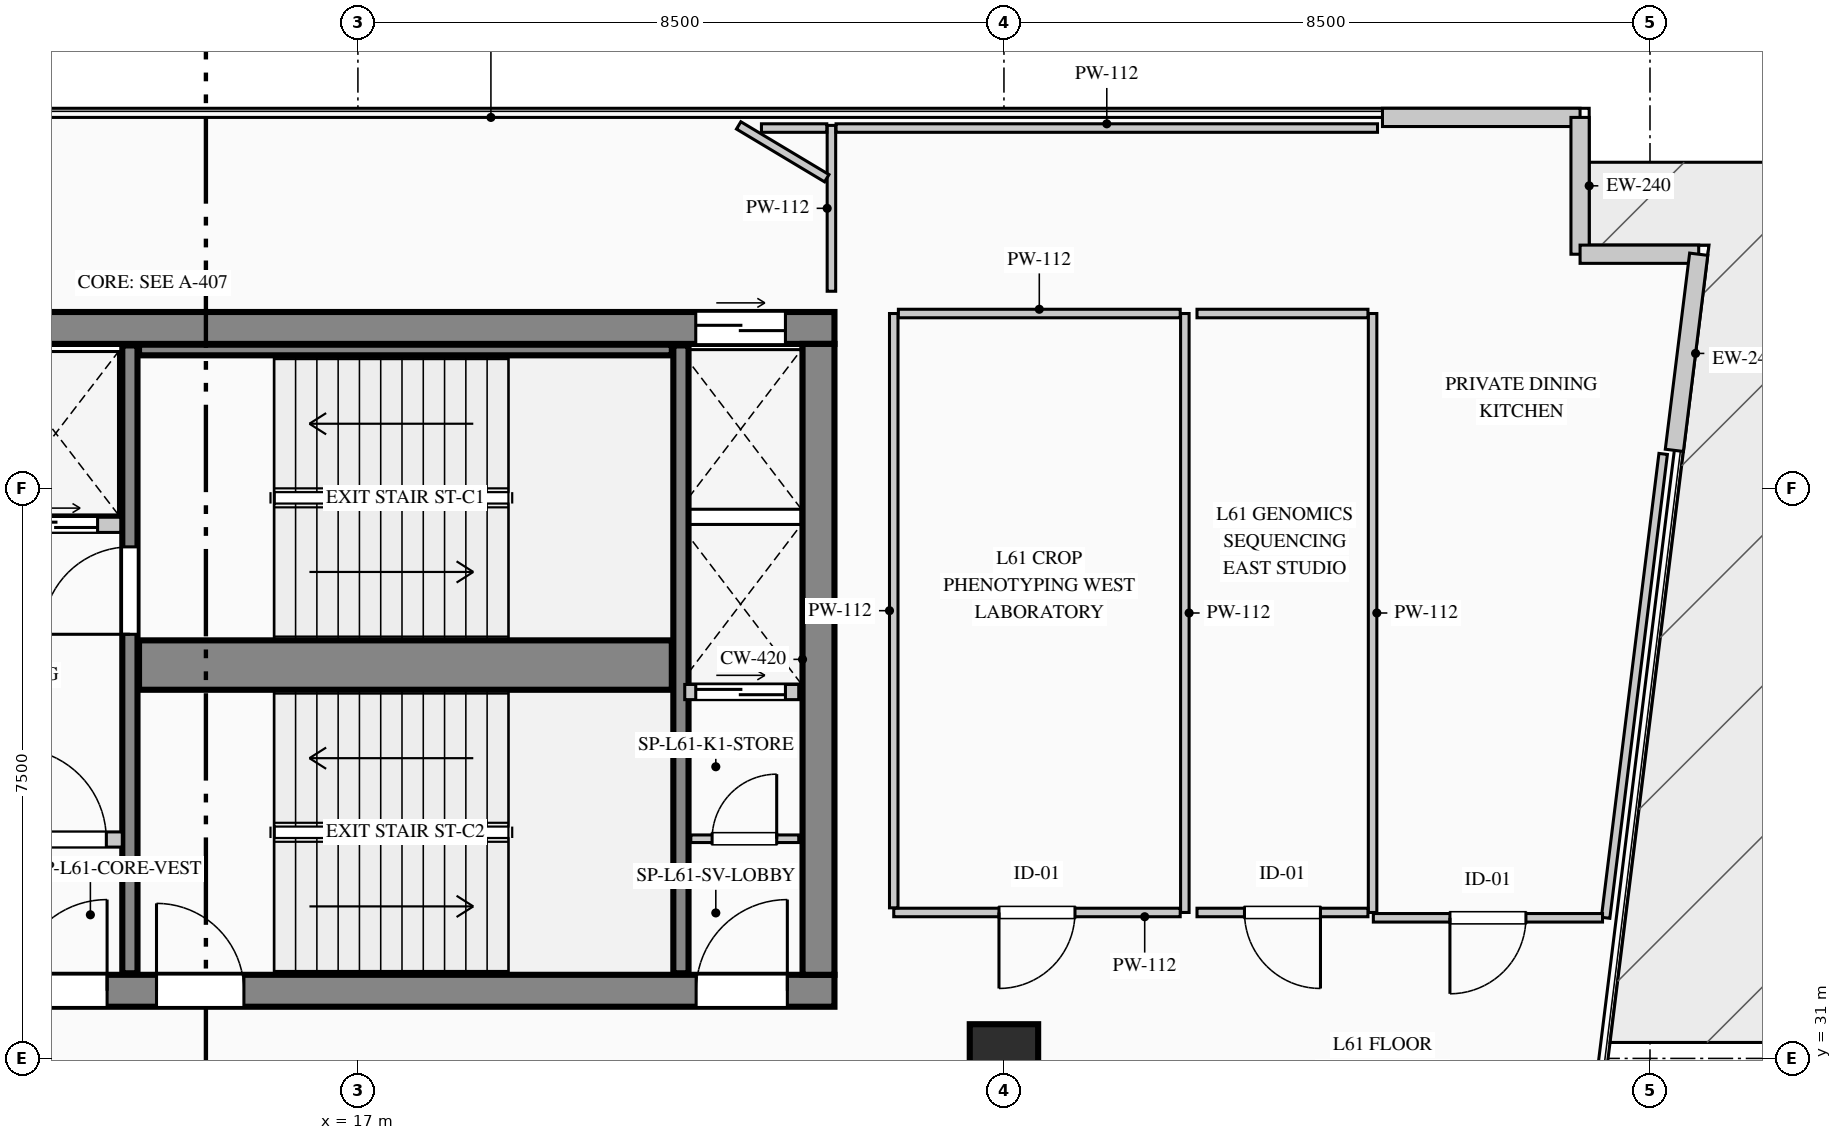
"""IFC4 building model, lengths in metres.
Left out: names, types, materials, properties, quantities, classifications, styles, units other than length and angle.
Written with IfcOpenShell. Run it as: python <this file> out.ifc"""

import sys

from ifc_helpers import new_model, si_unit, direction, frame, frame_2d, origin, origin_2d, place, context, subcontext, project, spatial, rectangle, extrude, element, fill, save


model = new_model("IFC4")
c1 = context("Model", 3, precision=1e-05, world=origin(), true_north=direction((0.0, 1.0)))
c2 = subcontext(c1, "Body", "Model", "MODEL_VIEW")
j1 = project(units=[si_unit("LENGTHUNIT", "METRE"), si_unit("PLANEANGLEUNIT", "RADIAN")], contexts=[c1])
p1 = place(None, origin())
s1 = spatial("IfcSite", under=j1, at=p1, CompositionType="ELEMENT")
p2 = place(p1, origin())
s2 = spatial("IfcBuilding", under=s1, at=p2, CompositionType="ELEMENT")
p3 = place(p2, frame((0.0, 0.0, 256.7)))
s3 = spatial("IfcBuildingStorey", under=s2, at=p3, CompositionType="ELEMENT", Elevation=256.7)
p4 = place(p3, frame((5.58, 40.61, 0.0), z_axis=(0.0, 0.0, 1.0), x_axis=(1.0, 0.0, 0.0)))
e1 = element("IfcWall", 1, at=p4, inside=s3, PredefinedType="SHEAR", context=c2, shape_type="SweptSolid", body=[
    extrude(rectangle(XDim=17.69, YDim=0.42, at=frame_2d((8.845, 0.0))), origin(), (0.0, 0.0, 1.0), 3.95),
])
p5 = place(p4, frame((15.865, 0.0, 0.0)))
e2 = element("IfcOpeningElement", 2, at=p5, cuts=e1, PredefinedType="OPENING", context=c2, shape_type="SweptSolid", body=[
    extrude(rectangle(XDim=1.18, YDim=2.25, at=frame_2d((0.59, 1.125))), frame((0.0, 0.22, 0.0), z_axis=(0.0, -1.0, 0.0), x_axis=(1.0, 0.0, 0.0)), (0.0, 0.0, 1.0), 0.44),
])
p6 = place(p3, frame((5.58, 31.89, 0.0), z_axis=(0.0, 0.0, 1.0), x_axis=(1.0, 0.0, 0.0)))
e3 = element("IfcWall", 3, at=p6, inside=s3, PredefinedType="SHEAR", context=c2, shape_type="SweptSolid", body=[
    extrude(rectangle(XDim=17.69, YDim=0.42, at=frame_2d((8.845, 0.0))), origin(), (0.0, 0.0, 1.0), 3.95),
])
p7 = place(p6, frame((3.07, 0.0, 0.0)))
e4 = element("IfcOpeningElement", 4, at=p7, cuts=e3, PredefinedType="OPENING", context=c2, shape_type="SweptSolid", body=[
    extrude(rectangle(XDim=1.2, YDim=2.2, at=frame_2d((0.6, 1.1))), frame((0.0, 0.22, 0.0), z_axis=(0.0, -1.0, 0.0), x_axis=(1.0, 0.0, 0.0)), (0.0, 0.0, 1.0), 0.44),
])
p8 = place(p6, frame((6.92, 0.0, 0.0)))
e5 = element("IfcOpeningElement", 5, at=p8, cuts=e3, PredefinedType="OPENING", context=c2, shape_type="SweptSolid", body=[
    extrude(rectangle(XDim=1.2, YDim=2.2, at=frame_2d((0.6, 1.1))), frame((0.0, 0.22, 0.0), z_axis=(0.0, -1.0, 0.0), x_axis=(1.0, 0.0, 0.0)), (0.0, 0.0, 1.0), 0.44),
])
p9 = place(p6, frame((8.77, 0.0, 0.0)))
e6 = element("IfcOpeningElement", 6, at=p9, cuts=e3, PredefinedType="OPENING", context=c2, shape_type="SweptSolid", body=[
    extrude(rectangle(XDim=1.15, YDim=2.2, at=frame_2d((0.575, 1.1))), frame((0.0, 0.22, 0.0), z_axis=(0.0, -1.0, 0.0), x_axis=(1.0, 0.0, 0.0)), (0.0, 0.0, 1.0), 0.44),
])
p10 = place(p6, frame((15.87, 0.0, 0.0)))
e7 = element("IfcOpeningElement", 7, at=p10, cuts=e3, PredefinedType="OPENING", context=c2, shape_type="SweptSolid", body=[
    extrude(rectangle(XDim=1.2, YDim=2.2, at=frame_2d((0.6, 1.1))), frame((0.0, 0.22, 0.0), z_axis=(0.0, -1.0, 0.0), x_axis=(1.0, 0.0, 0.0)), (0.0, 0.0, 1.0), 0.44),
])
p11 = place(p3, frame((23.06, 32.1, 0.0), z_axis=(0.0, 0.0, 1.0), x_axis=(0.0, 1.0, 0.0)))
e8 = element("IfcWall", 8, at=p11, inside=s3, PredefinedType="SHEAR", context=c2, shape_type="SweptSolid", body=[
    extrude(rectangle(XDim=8.3, YDim=0.42, at=frame_2d((4.15, 0.0))), origin(), (0.0, 0.0, 1.0), 3.95),
])
p12 = place(p3, frame((14.0, 32.12, 0.0), z_axis=(0.0, 0.0, 1.0), x_axis=(0.0, 1.0, 0.0)))
e9 = element("IfcWall", 9, at=p12, inside=s3, PredefinedType="SHEAR", context=c2, shape_type="SweptSolid", body=[
    extrude(rectangle(XDim=8.26, YDim=0.2, at=frame_2d((4.13, 0.0))), origin(), (0.0, 0.0, 1.0), 3.95),
])
p13 = place(p12, frame((4.46, 0.0, 0.0)))
e10 = element("IfcOpeningElement", 10, at=p13, cuts=e9, PredefinedType="OPENING", context=c2, shape_type="SweptSolid", body=[
    extrude(rectangle(XDim=1.15, YDim=2.2, at=frame_2d((0.575, 1.1))), frame((0.0, 0.11, 0.0), z_axis=(0.0, -1.0, 0.0), x_axis=(1.0, 0.0, 0.0)), (0.0, 0.0, 1.0), 0.22),
])
p14 = place(p3, frame((14.12, 36.175, 0.0), z_axis=(0.0, 0.0, 1.0), x_axis=(1.0, 0.0, 0.0)))
e11 = element("IfcWall", 11, at=p14, inside=s3, PredefinedType="SHEAR", context=c2, shape_type="SweptSolid", body=[
    extrude(rectangle(XDim=7.01, YDim=0.65, at=frame_2d((3.505, 0.0))), origin(), (0.0, 0.0, 1.0), 3.95),
])
p15 = place(p3, frame((21.25, 32.12, 0.0), z_axis=(0.0, 0.0, 1.0), x_axis=(0.0, 1.0, 0.0)))
e12 = element("IfcWall", 12, at=p15, inside=s3, PredefinedType="SHEAR", context=c2, shape_type="SweptSolid", body=[
    extrude(rectangle(XDim=8.26, YDim=0.2, at=frame_2d((4.13, 0.0))), origin(), (0.0, 0.0, 1.0), 3.95),
])
p16 = place(p3, frame((14.12, 40.32, 0.0), z_axis=(0.0, 0.0, 1.0), x_axis=(1.0, 0.0, 0.0)))
e13 = element("IfcWall", 13, at=p16, inside=s3, PredefinedType="SHEAR", context=c2, shape_type="SweptSolid", body=[
    extrude(rectangle(XDim=7.01, YDim=0.14, at=frame_2d((3.505, 0.0))), origin(), (0.0, 0.0, 1.0), 3.95),
])
p17 = place(p3, frame((25.5, 31.0, 0.0), z_axis=(0.0, 0.0, 1.0), x_axis=(1.0, 0.0, 0.0)))
e14 = element("IfcColumn", 14, at=p17, inside=s3, PredefinedType="COLUMN", context=c2, shape_type="SweptSolid", body=[
    extrude(rectangle(XDim=0.9, YDim=0.9, at=origin_2d()), origin(), (0.0, 0.0, 1.0), 3.95),
])
p18 = place(p3, frame((30.48, 43.38, 0.0), z_axis=(0.0, 0.0, 1.0), x_axis=(1.0, 0.0, 0.0)))
e15 = element("IfcWall", 15, at=p18, inside=s3, PredefinedType="STANDARD", context=c2, shape_type="SweptSolid", body=[
    extrude(rectangle(XDim=2.6, YDim=0.24, at=frame_2d((1.3, 0.0))), origin(), (0.0, 0.0, 1.0), 3.7),
])
p19 = place(p3, frame((33.08, 43.38, 0.0), z_axis=(0.0, 0.0, 1.0), x_axis=(0.0, -1.0, 0.0)))
e16 = element("IfcWall", 16, at=p19, inside=s3, PredefinedType="STANDARD", context=c2, shape_type="SweptSolid", body=[
    extrude(rectangle(XDim=1.8, YDim=0.24, at=frame_2d((0.9, 0.0))), origin(), (0.0, 0.0, 1.0), 3.7),
])
p20 = place(p3, frame((33.08, 41.58, 0.0), z_axis=(0.0, 0.0, 1.0), x_axis=(1.0, 0.0, 0.0)))
e17 = element("IfcWall", 17, at=p20, inside=s3, PredefinedType="STANDARD", context=c2, shape_type="SweptSolid", body=[
    extrude(rectangle(XDim=1.561, YDim=0.24, at=frame_2d((0.78, 0.0))), origin(), (0.0, 0.0, 1.0), 3.7),
])
p21 = place(p3, frame((34.641, 41.58, 0.0), z_axis=(0.0, 0.0, 1.0), x_axis=(-0.123191073593, -0.992382970121, 0.0)))
e18 = element("IfcWall", 18, at=p21, inside=s3, PredefinedType="STANDARD", context=c2, shape_type="SweptSolid", body=[
    extrude(rectangle(XDim=2.6, YDim=0.24, at=frame_2d((1.3, 0.0))), origin(), (0.0, 0.0, 1.0), 3.7),
])
p22 = place(p3, frame((10.34, 38.02, 0.0), z_axis=(0.0, 0.0, 1.0), x_axis=(1.0, 0.0, 0.0)))
e19 = element("IfcWall", 19, at=p22, inside=s3, PredefinedType="PARTITIONING", context=c2, shape_type="SweptSolid", body=[
    extrude(rectangle(XDim=3.54, YDim=0.2, at=frame_2d((1.77, 0.0))), origin(), (0.0, 0.0, 1.0), 3.7),
])
p23 = place(p22, frame((0.285, 0.0, 0.0)))
e20 = element("IfcOpeningElement", 20, at=p23, cuts=e19, PredefinedType="OPENING", context=c2, shape_type="SweptSolid", body=[
    extrude(rectangle(XDim=1.1, YDim=2.2, at=frame_2d((0.55, 1.1))), frame((0.0, 0.11, 0.0), z_axis=(0.0, -1.0, 0.0), x_axis=(1.0, 0.0, 0.0)), (0.0, 0.0, 1.0), 0.22),
])
p24 = place(p22, frame((2.135, 0.0, 0.0)))
e21 = element("IfcOpeningElement", 21, at=p24, cuts=e19, PredefinedType="OPENING", context=c2, shape_type="SweptSolid", body=[
    extrude(rectangle(XDim=1.1, YDim=2.2, at=frame_2d((0.55, 1.1))), frame((0.0, 0.11, 0.0), z_axis=(0.0, -1.0, 0.0), x_axis=(1.0, 0.0, 0.0)), (0.0, 0.0, 1.0), 0.22),
])
p25 = place(p3, frame((10.34, 33.88, 0.0), z_axis=(0.0, 0.0, 1.0), x_axis=(1.0, 0.0, 0.0)))
e22 = element("IfcWall", 22, at=p25, inside=s3, PredefinedType="PARTITIONING", context=c2, shape_type="SweptSolid", body=[
    extrude(rectangle(XDim=3.56, YDim=0.2, at=frame_2d((1.78, 0.0))), origin(), (0.0, 0.0, 1.0), 3.7),
])
p26 = place(p25, frame((2.15, 0.0, 0.0)))
e23 = element("IfcOpeningElement", 23, at=p26, cuts=e22, PredefinedType="OPENING", context=c2, shape_type="SweptSolid", body=[
    extrude(rectangle(XDim=1.2, YDim=2.2, at=frame_2d((0.6, 1.1))), frame((0.0, 0.11, 0.0), z_axis=(0.0, -1.0, 0.0), x_axis=(1.0, 0.0, 0.0)), (0.0, 0.0, 1.0), 0.22),
])
p27 = place(p3, frame((21.38, 33.89, 0.0), z_axis=(0.0, 0.0, 1.0), x_axis=(1.0, 0.0, 0.0)))
e24 = element("IfcWall", 24, at=p27, inside=s3, PredefinedType="PARTITIONING", context=c2, shape_type="SweptSolid", body=[
    extrude(rectangle(XDim=1.42, YDim=0.1, at=frame_2d((0.71, 0.0))), origin(), (0.0, 0.0, 1.0), 3.7),
])
p28 = place(p27, frame((0.28, 0.0, 0.0)))
e25 = element("IfcOpeningElement", 25, at=p28, cuts=e24, PredefinedType="OPENING", context=c2, shape_type="SweptSolid", body=[
    extrude(rectangle(XDim=0.85, YDim=2.1, at=frame_2d((0.425, 1.05))), frame((0.0, 0.06, 0.0), z_axis=(0.0, -1.0, 0.0), x_axis=(1.0, 0.0, 0.0)), (0.0, 0.0, 1.0), 0.12),
])
p29 = place(p3, frame((21.3, 35.82, 0.0), z_axis=(0.0, 0.0, 1.0), x_axis=(1.0, 0.0, 0.0)))
e26 = element("IfcWall", 26, at=p29, inside=s3, PredefinedType="PARTITIONING", context=c2, shape_type="SweptSolid", body=[
    extrude(rectangle(XDim=1.5, YDim=0.2, at=frame_2d((0.75, 0.0))), origin(), (0.0, 0.0, 1.0), 3.7),
])
p30 = place(p29, frame((0.145, 0.0, 0.0)))
e27 = element("IfcOpeningElement", 27, at=p30, cuts=e26, PredefinedType="OPENING", context=c2, shape_type="SweptSolid", body=[
    extrude(rectangle(XDim=1.18, YDim=2.25, at=frame_2d((0.59, 1.125))), frame((0.0, 0.11, 0.0), z_axis=(0.0, -1.0, 0.0), x_axis=(1.0, 0.0, 0.0)), (0.0, 0.0, 1.0), 0.22),
])
p31 = place(p3, frame((27.88, 40.8, 0.0), z_axis=(0.0, 0.0, 1.0), x_axis=(0.0, -1.0, 0.0)))
e28 = element("IfcWall", 28, at=p31, inside=s3, PredefinedType="PARTITIONING", context=c2, shape_type="SweptSolid", body=[
    extrude(rectangle(XDim=7.88, YDim=0.112, at=frame_2d((3.94, 0.0))), origin(), (0.0, 0.0, 1.0), 3.7),
])
p32 = place(p3, frame((27.819, 32.92, 0.0), z_axis=(0.0, 0.0, 1.0), x_axis=(-1.0, 0.0, 0.0)))
e29 = element("IfcWall", 29, at=p32, inside=s3, PredefinedType="PARTITIONING", context=c2, shape_type="SweptSolid", body=[
    extrude(rectangle(XDim=3.769, YDim=0.112, at=frame_2d((1.885, 0.0))), origin(), (0.0, 0.0, 1.0), 3.7),
])
p33 = place(p32, frame((1.385, 0.0, 0.0)))
e30 = element("IfcOpeningElement", 30, at=p33, cuts=e29, PredefinedType="OPENING", context=c2, shape_type="SweptSolid", body=[
    extrude(rectangle(XDim=1.0, YDim=2.15, at=frame_2d((0.5, 1.075))), frame((0.0, 0.066, 0.0), z_axis=(0.0, -1.0, 0.0), x_axis=(1.0, 0.0, 0.0)), (0.0, 0.0, 1.0), 0.132),
])
p34 = place(p3, frame((24.05, 32.981, 0.0), z_axis=(0.0, 0.0, 1.0), x_axis=(0.0, 1.0, 0.0)))
e31 = element("IfcWall", 31, at=p34, inside=s3, PredefinedType="PARTITIONING", context=c2, shape_type="SweptSolid", body=[
    extrude(rectangle(XDim=7.819, YDim=0.112, at=frame_2d((3.91, 0.0))), origin(), (0.0, 0.0, 1.0), 3.7),
])
p35 = place(p3, frame((24.111, 40.8, 0.0), z_axis=(0.0, 0.0, 1.0), x_axis=(1.0, 0.0, 0.0)))
e32 = element("IfcWall", 32, at=p35, inside=s3, PredefinedType="PARTITIONING", context=c2, shape_type="SweptSolid", body=[
    extrude(rectangle(XDim=3.708, YDim=0.112, at=frame_2d((1.854, 0.0))), origin(), (0.0, 0.0, 1.0), 3.7),
])
p36 = place(p3, frame((30.35, 40.8, 0.0), z_axis=(0.0, 0.0, 1.0), x_axis=(0.0, -1.0, 0.0)))
e33 = element("IfcWall", 33, at=p36, inside=s3, PredefinedType="PARTITIONING", context=c2, shape_type="SweptSolid", body=[
    extrude(rectangle(XDim=7.88, YDim=0.112, at=frame_2d((3.94, 0.0))), origin(), (0.0, 0.0, 1.0), 3.7),
])
p37 = place(p3, frame((30.289, 32.92, 0.0), z_axis=(0.0, 0.0, 1.0), x_axis=(-1.0, 0.0, 0.0)))
e34 = element("IfcWall", 34, at=p37, inside=s3, PredefinedType="PARTITIONING", context=c2, shape_type="SweptSolid", body=[
    extrude(rectangle(XDim=2.249, YDim=0.112, at=frame_2d((1.125, 0.0))), origin(), (0.0, 0.0, 1.0), 3.7),
])
p38 = place(p37, frame((0.625, 0.0, 0.0)))
e35 = element("IfcOpeningElement", 35, at=p38, cuts=e34, PredefinedType="OPENING", context=c2, shape_type="SweptSolid", body=[
    extrude(rectangle(XDim=1.0, YDim=2.15, at=frame_2d((0.5, 1.075))), frame((0.0, 0.066, 0.0), z_axis=(0.0, -1.0, 0.0), x_axis=(1.0, 0.0, 0.0)), (0.0, 0.0, 1.0), 0.132),
])
p39 = place(p3, frame((28.04, 40.8, 0.0), z_axis=(0.0, 0.0, 1.0), x_axis=(1.0, 0.0, 0.0)))
e36 = element("IfcWall", 36, at=p39, inside=s3, PredefinedType="PARTITIONING", context=c2, shape_type="SweptSolid", body=[
    extrude(rectangle(XDim=2.249, YDim=0.112, at=frame_2d((1.125, 0.0))), origin(), (0.0, 0.0, 1.0), 3.7),
])
p40 = place(p3, frame((23.23, 41.093, 0.0), z_axis=(0.0, 0.0, 1.0), x_axis=(0.0, 1.0, 0.0)))
e37 = element("IfcWall", 37, at=p40, inside=s3, PredefinedType="PARTITIONING", context=c2, shape_type="SweptSolid", body=[
    extrude(rectangle(XDim=2.182, YDim=0.112, at=frame_2d((1.091, 0.0))), origin(), (0.0, 0.0, 1.0), 3.7),
])
p41 = place(p3, frame((23.169, 42.58, 0.0), z_axis=(0.0, 0.0, 1.0), x_axis=(-0.857763736618, 0.514044134431, 0.0)))
e38 = element("IfcWall", 38, at=p41, inside=s3, PredefinedType="PARTITIONING", context=c2, shape_type="SweptSolid", body=[
    extrude(rectangle(XDim=1.352, YDim=0.112, at=frame_2d((0.676, 0.0))), origin(), (0.0, 0.0, 1.0), 3.7),
])
p42 = place(p3, frame((22.309, 43.24, 0.0), z_axis=(0.0, 0.0, 1.0), x_axis=(1.0, 0.0, 0.0)))
e39 = element("IfcWall", 39, at=p42, inside=s3, PredefinedType="PARTITIONING", context=c2, shape_type="SweptSolid", body=[
    extrude(rectangle(XDim=0.86, YDim=0.112, at=frame_2d((0.43, 0.0))), origin(), (0.0, 0.0, 1.0), 3.7),
])
p43 = place(p3, frame((23.291, 43.24, 0.0), z_axis=(0.0, 0.0, 1.0), x_axis=(1.0, 0.0, 0.0)))
e40 = element("IfcWall", 40, at=p43, inside=s3, PredefinedType="PARTITIONING", context=c2, shape_type="SweptSolid", body=[
    extrude(rectangle(XDim=7.124, YDim=0.112, at=frame_2d((3.562, 0.0))), origin(), (0.0, 0.0, 1.0), 3.7),
])
p44 = place(p3, frame((34.173, 38.953, 0.0), z_axis=(0.0, 0.0, 1.0), x_axis=(-0.123155137196, -0.992387430484, 0.0)))
e41 = element("IfcWall", 41, at=p44, inside=s3, PredefinedType="PARTITIONING", context=c2, shape_type="SweptSolid", body=[
    extrude(rectangle(XDim=6.149, YDim=0.112, at=frame_2d((3.075, 0.0))), origin(), (0.0, 0.0, 1.0), 3.7),
])
p45 = place(p3, frame((33.375, 32.85, 0.0), z_axis=(0.0, 0.0, 1.0), x_axis=(-1.0, 0.0, 0.0)))
e42 = element("IfcWall", 42, at=p45, inside=s3, PredefinedType="PARTITIONING", context=c2, shape_type="SweptSolid", body=[
    extrude(rectangle(XDim=3.015, YDim=0.112, at=frame_2d((1.508, 0.0))), origin(), (0.0, 0.0, 1.0), 3.7),
])
p46 = place(p45, frame((1.008, 0.0, 0.0)))
e43 = element("IfcOpeningElement", 43, at=p46, cuts=e42, PredefinedType="OPENING", context=c2, shape_type="SweptSolid", body=[
    extrude(rectangle(XDim=1.0, YDim=2.15, at=frame_2d((0.5, 1.075))), frame((0.0, 0.066, 0.0), z_axis=(0.0, -1.0, 0.0), x_axis=(1.0, 0.0, 0.0)), (0.0, 0.0, 1.0), 0.132),
])
p47 = place(p8, origin())
e44 = element("IfcDoor", 44, at=p47, inside=s3, OperationType="SINGLE_SWING_RIGHT", PredefinedType="DOOR", context=c2, shape_type="SweptSolid", body=[
    extrude(rectangle(XDim=1.2, YDim=2.2, at=frame_2d((0.6, 1.1))), frame((0.0, 0.025, 0.0), z_axis=(0.0, -1.0, 0.0), x_axis=(1.0, 0.0, 0.0)), (0.0, 0.0, 1.0), 0.05),
])
fill(e5, e44)
p48 = place(p9, origin())
e45 = element("IfcDoor", 45, at=p48, inside=s3, OperationType="SINGLE_SWING_LEFT", PredefinedType="DOOR", context=c2, shape_type="SweptSolid", body=[
    extrude(rectangle(XDim=1.15, YDim=2.2, at=frame_2d((0.575, 1.1))), frame((0.0, 0.025, 0.0), z_axis=(0.0, -1.0, 0.0), x_axis=(1.0, 0.0, 0.0)), (0.0, 0.0, 1.0), 0.05),
])
fill(e6, e45)
p49 = place(p10, origin())
e46 = element("IfcDoor", 46, at=p49, inside=s3, OperationType="SINGLE_SWING_RIGHT", PredefinedType="DOOR", context=c2, shape_type="SweptSolid", body=[
    extrude(rectangle(XDim=1.2, YDim=2.2, at=frame_2d((0.6, 1.1))), frame((0.0, 0.025, 0.0), z_axis=(0.0, -1.0, 0.0), x_axis=(1.0, 0.0, 0.0)), (0.0, 0.0, 1.0), 0.05),
])
fill(e7, e46)
p50 = place(p26, origin())
e47 = element("IfcDoor", 47, at=p50, inside=s3, OperationType="SINGLE_SWING_LEFT", PredefinedType="DOOR", context=c2, shape_type="SweptSolid", body=[
    extrude(rectangle(XDim=1.2, YDim=2.2, at=frame_2d((0.6, 1.1))), frame((0.0, 0.025, 0.0), z_axis=(0.0, -1.0, 0.0), x_axis=(1.0, 0.0, 0.0)), (0.0, 0.0, 1.0), 0.05),
])
fill(e23, e47)
p51 = place(p28, origin())
e48 = element("IfcDoor", 48, at=p51, inside=s3, OperationType="SINGLE_SWING_RIGHT", PredefinedType="DOOR", context=c2, shape_type="SweptSolid", body=[
    extrude(rectangle(XDim=0.85, YDim=2.1, at=frame_2d((0.425, 1.05))), frame((0.0, 0.025, 0.0), z_axis=(0.0, -1.0, 0.0), x_axis=(1.0, 0.0, 0.0)), (0.0, 0.0, 1.0), 0.05),
])
fill(e25, e48)
p52 = place(p13, origin())
e49 = element("IfcDoor", 49, at=p52, inside=s3, OperationType="SINGLE_SWING_LEFT", PredefinedType="DOOR", context=c2, shape_type="SweptSolid", body=[
    extrude(rectangle(XDim=1.15, YDim=2.2, at=frame_2d((0.575, 1.1))), frame((0.0, 0.025, 0.0), z_axis=(0.0, -1.0, 0.0), x_axis=(1.0, 0.0, 0.0)), (0.0, 0.0, 1.0), 0.05),
])
fill(e10, e49)
p53 = place(p24, origin())
e50 = element("IfcDoor", 50, at=p53, inside=s3, OperationType="DOUBLE_DOOR_SLIDING", PredefinedType="DOOR", context=c2, shape_type="SweptSolid", body=[
    extrude(rectangle(XDim=1.1, YDim=2.2, at=frame_2d((0.55, 1.1))), frame((0.0, 0.025, 0.0), z_axis=(0.0, -1.0, 0.0), x_axis=(1.0, 0.0, 0.0)), (0.0, 0.0, 1.0), 0.05),
])
fill(e21, e50)
p54 = place(p5, origin())
e51 = element("IfcDoor", 51, at=p54, inside=s3, OperationType="DOUBLE_DOOR_SLIDING", PredefinedType="DOOR", context=c2, shape_type="SweptSolid", body=[
    extrude(rectangle(XDim=1.18, YDim=2.25, at=frame_2d((0.59, 1.125))), frame((0.0, 0.025, 0.0), z_axis=(0.0, -1.0, 0.0), x_axis=(1.0, 0.0, 0.0)), (0.0, 0.0, 1.0), 0.05),
])
fill(e2, e51)
p55 = place(p30, origin())
e52 = element("IfcDoor", 52, at=p55, inside=s3, OperationType="DOUBLE_DOOR_SLIDING", PredefinedType="DOOR", context=c2, shape_type="SweptSolid", body=[
    extrude(rectangle(XDim=1.18, YDim=2.25, at=frame_2d((0.59, 1.125))), frame((0.0, 0.025, 0.0), z_axis=(0.0, -1.0, 0.0), x_axis=(1.0, 0.0, 0.0)), (0.0, 0.0, 1.0), 0.05),
])
fill(e27, e52)
p56 = place(p33, origin())
e53 = element("IfcDoor", 53, at=p56, inside=s3, OperationType="SINGLE_SWING_RIGHT", PredefinedType="DOOR", context=c2, shape_type="SweptSolid", body=[
    extrude(rectangle(XDim=1.0, YDim=2.15, at=frame_2d((0.5, 1.075))), frame((0.0, 0.025, 0.0), z_axis=(0.0, -1.0, 0.0), x_axis=(1.0, 0.0, 0.0)), (0.0, 0.0, 1.0), 0.05),
])
fill(e30, e53)
p57 = place(p38, origin())
e54 = element("IfcDoor", 54, at=p57, inside=s3, OperationType="SINGLE_SWING_LEFT", PredefinedType="DOOR", context=c2, shape_type="SweptSolid", body=[
    extrude(rectangle(XDim=1.0, YDim=2.15, at=frame_2d((0.5, 1.075))), frame((0.0, 0.025, 0.0), z_axis=(0.0, -1.0, 0.0), x_axis=(1.0, 0.0, 0.0)), (0.0, 0.0, 1.0), 0.05),
])
fill(e35, e54)
p58 = place(p46, origin())
e55 = element("IfcDoor", 55, at=p58, inside=s3, OperationType="SINGLE_SWING_RIGHT", PredefinedType="DOOR", context=c2, shape_type="SweptSolid", body=[
    extrude(rectangle(XDim=1.0, YDim=2.15, at=frame_2d((0.5, 1.075))), frame((0.0, 0.025, 0.0), z_axis=(0.0, -1.0, 0.0), x_axis=(1.0, 0.0, 0.0)), (0.0, 0.0, 1.0), 0.05),
])
fill(e43, e55)
save(model, sys.argv[1])
